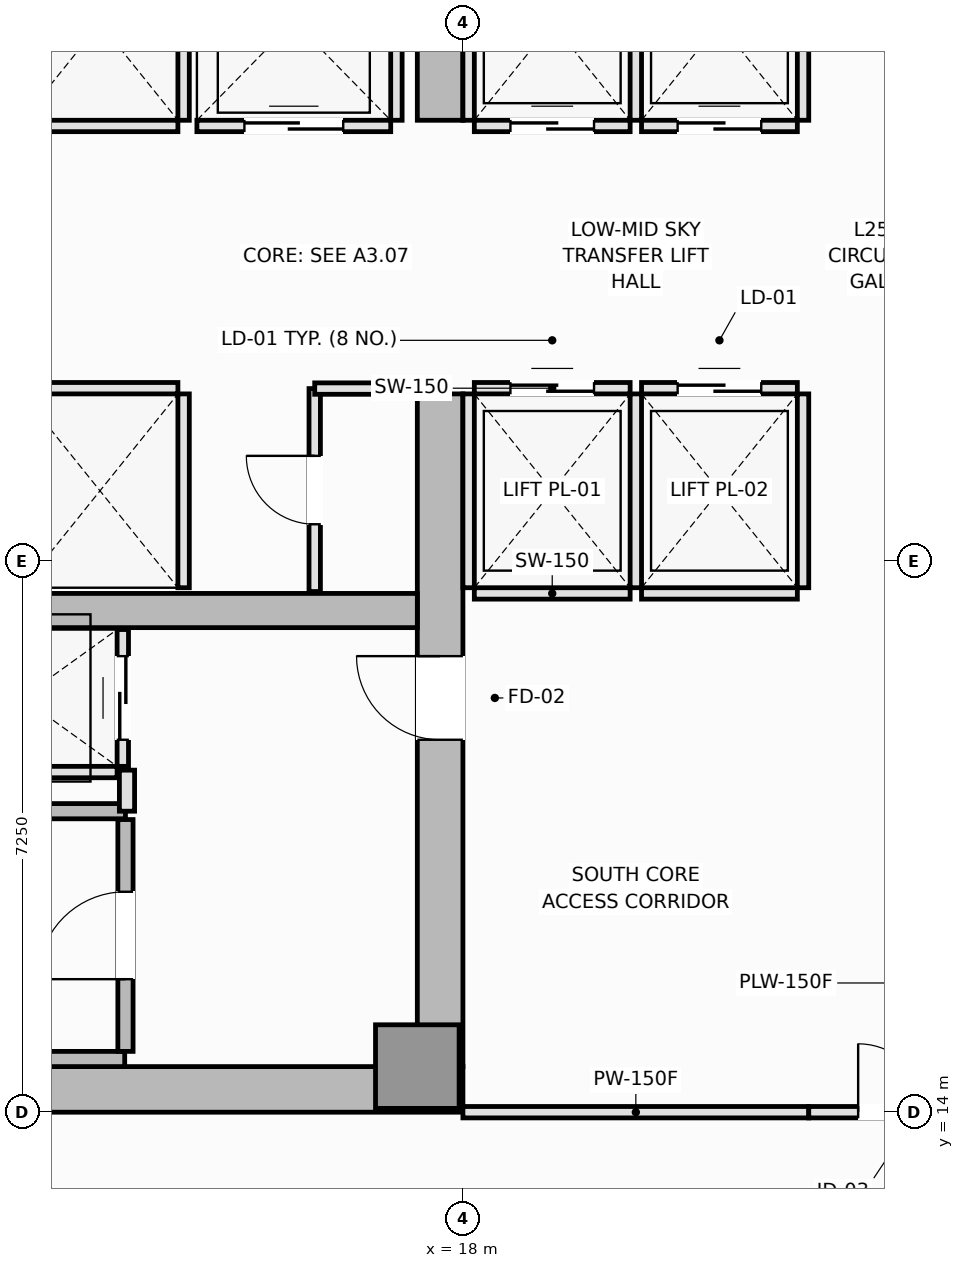
"""IFC4 building model, lengths in metres.
Left out: names, types, materials, properties, quantities, classifications, styles, units other than length and angle.
Written with IfcOpenShell. Run it as: python <this file> out.ifc"""

import sys

from ifc_helpers import new_model, si_unit, direction, frame, frame_2d, origin, origin_2d, place, context, subcontext, project, spatial, rectangle, extrude, element, fill, save


model = new_model("IFC4")
c1 = context("Model", 3, precision=1e-05, world=origin(), true_north=direction((0.0, 1.0)))
c2 = subcontext(c1, "Body", "Model", "MODEL_VIEW")
j1 = project(units=[si_unit("LENGTHUNIT", "METRE"), si_unit("PLANEANGLEUNIT", "RADIAN")], contexts=[c1])
p1 = place(None, origin())
s1 = spatial("IfcSite", under=j1, at=p1, CompositionType="ELEMENT")
p2 = place(p1, origin())
s2 = spatial("IfcBuilding", under=s1, at=p2, CompositionType="ELEMENT")
p3 = place(p2, frame((0.0, 0.0, 97.85)))
s3 = spatial("IfcBuildingStorey", under=s2, at=p3, CompositionType="ELEMENT", Elevation=97.85)
p4 = place(p3, frame((4.5, 14.3, 0.0), z_axis=(0.0, 0.0, 1.0), x_axis=(1.0, 0.0, 0.0)))
e1 = element("IfcWall", 1, at=p4, inside=s3, PredefinedType="SHEAR", context=c2, shape_type="SweptSolid", body=[
    extrude(rectangle(XDim=13.5, YDim=0.6, at=frame_2d((6.75, 0.0))), origin(), (0.0, 0.0, 1.0), 4.4),
])
p5 = place(p3, frame((17.7, 14.6, 0.0), z_axis=(0.0, 0.0, 1.0), x_axis=(0.0, 1.0, 0.0)))
e2 = element("IfcWall", 2, at=p5, inside=s3, PredefinedType="SHEAR", context=c2, shape_type="SweptSolid", body=[
    extrude(rectangle(XDim=8.85, YDim=0.6, at=frame_2d((4.425, 0.0))), origin(), (0.0, 0.0, 1.0), 4.4),
])
p6 = place(p5, frame((4.3, 0.0, 0.0)))
e3 = element("IfcOpeningElement", 3, at=p6, cuts=e2, PredefinedType="OPENING", context=c2, shape_type="SweptSolid", body=[
    extrude(rectangle(XDim=1.1, YDim=2.15, at=frame_2d((0.55, 1.075))), frame((0.0, 0.31, 0.0), z_axis=(0.0, -1.0, 0.0), x_axis=(1.0, 0.0, 0.0)), (0.0, 0.0, 1.0), 0.62),
])
p7 = place(p3, frame((17.7, 27.05, 0.0), z_axis=(0.0, 0.0, 1.0), x_axis=(0.0, 1.0, 0.0)))
e4 = element("IfcWall", 4, at=p7, inside=s3, PredefinedType="SHEAR", context=c2, shape_type="SweptSolid", body=[
    extrude(rectangle(XDim=8.85, YDim=0.6, at=frame_2d((4.425, 0.0))), origin(), (0.0, 0.0, 1.0), 4.4),
])
p8 = place(p7, frame((3.45, 0.0, 0.0)))
e5 = element("IfcOpeningElement", 5, at=p8, cuts=e4, PredefinedType="OPENING", context=c2, shape_type="SweptSolid", body=[
    extrude(rectangle(XDim=1.1, YDim=2.15, at=frame_2d((0.55, 1.075))), frame((0.0, 0.31, 0.0), z_axis=(0.0, -1.0, 0.0), x_axis=(1.0, 0.0, 0.0)), (0.0, 0.0, 1.0), 0.62),
])
p9 = place(p3, frame((5.1, 20.6, 0.0), z_axis=(0.0, 0.0, 1.0), x_axis=(1.0, 0.0, 0.0)))
e6 = element("IfcWall", 6, at=p9, inside=s3, PredefinedType="SHEAR", context=c2, shape_type="SweptSolid", body=[
    extrude(rectangle(XDim=12.3, YDim=0.45, at=frame_2d((6.15, 0.0))), origin(), (0.0, 0.0, 1.0), 4.4),
])
p10 = place(p3, frame((17.4, 14.6, 0.0), z_axis=(0.0, 0.0, 1.0), x_axis=(1.0, 0.0, 0.0)))
e7 = element("IfcColumn", 7, at=p10, inside=s3, PredefinedType="PILASTER", context=c2, shape_type="SweptSolid", body=[
    extrude(rectangle(XDim=1.1, YDim=1.1, at=origin_2d()), origin(), (0.0, 0.0, 1.0), 4.4),
])
p11 = place(p3, frame((5.8, 14.7, 0.0), z_axis=(0.0, 0.0, 1.0), x_axis=(1.0, 0.0, 0.0)))
e8 = element("IfcWall", 8, at=p11, inside=s3, PredefinedType="SOLIDWALL", context=c2, shape_type="SweptSolid", body=[
    extrude(rectangle(XDim=7.75, YDim=0.2, at=frame_2d((3.875, 0.0))), origin(), (0.0, 0.0, 1.0), 4.4),
])
p12 = place(p3, frame((5.9, 17.96, 0.0), z_axis=(0.0, 0.0, 1.0), x_axis=(1.0, 0.0, 0.0)))
e9 = element("IfcWall", 9, at=p12, inside=s3, PredefinedType="SOLIDWALL", context=c2, shape_type="SweptSolid", body=[
    extrude(rectangle(XDim=7.66, YDim=0.2, at=frame_2d((3.83, 0.0))), origin(), (0.0, 0.0, 1.0), 4.4),
])
p13 = place(p3, frame((13.56, 14.8, 0.0), z_axis=(0.0, 0.0, 1.0), x_axis=(0.0, 1.0, 0.0)))
e10 = element("IfcWall", 10, at=p13, inside=s3, PredefinedType="SOLIDWALL", context=c2, shape_type="SweptSolid", body=[
    extrude(rectangle(XDim=3.05, YDim=0.2, at=frame_2d((1.525, 0.0))), origin(), (0.0, 0.0, 1.0), 4.4),
])
p14 = place(p13, frame((0.95, 0.0, 0.0)))
e11 = element("IfcOpeningElement", 11, at=p14, cuts=e10, PredefinedType="OPENING", context=c2, shape_type="SweptSolid", body=[
    extrude(rectangle(XDim=1.15, YDim=2.15, at=frame_2d((0.575, 1.075))), frame((0.0, 0.11, 0.0), z_axis=(0.0, -1.0, 0.0), x_axis=(1.0, 0.0, 0.0)), (0.0, 0.0, 1.0), 0.22),
])
p15 = place(p3, frame((18.15, 20.825, 0.0), z_axis=(0.0, 0.0, 1.0), x_axis=(1.0, 0.0, 0.0)))
e12 = element("IfcWall", 12, at=p15, inside=s3, PredefinedType="PARTITIONING", context=c2, shape_type="SweptSolid", body=[
    extrude(rectangle(XDim=2.05, YDim=0.15, at=frame_2d((1.025, 0.0))), origin(), (0.0, 0.0, 1.0), 4.22),
])
p16 = place(p3, frame((18.15, 23.525, 0.0), z_axis=(0.0, 0.0, 1.0), x_axis=(1.0, 0.0, 0.0)))
e13 = element("IfcWall", 13, at=p16, inside=s3, PredefinedType="PARTITIONING", context=c2, shape_type="SweptSolid", body=[
    extrude(rectangle(XDim=2.05, YDim=0.15, at=frame_2d((1.025, 0.0))), origin(), (0.0, 0.0, 1.0), 4.22),
])
p17 = place(p16, frame((0.475, 0.0, 0.0)))
e14 = element("IfcOpeningElement", 14, at=p17, cuts=e13, PredefinedType="OPENING", context=c2, shape_type="SweptSolid", body=[
    extrude(rectangle(XDim=1.1, YDim=2.2, at=frame_2d((0.55, 1.1))), frame((0.0, 0.085, 0.0), z_axis=(0.0, -1.0, 0.0), x_axis=(1.0, 0.0, 0.0)), (0.0, 0.0, 1.0), 0.17),
])
for number, where, z_axis, x_axis in (
    (15, (18.075, 20.9, 0.0), (0.0, 0.0, 1.0), (0.0, 1.0, 0.0)),
    (16, (20.275, 20.9, 0.0), (0.0, 0.0, 1.0), (0.0, 1.0, 0.0)),
):
    element("IfcWall", number, at=place(p3, frame(where, z_axis=z_axis, x_axis=x_axis)), inside=s3, PredefinedType="PARTITIONING", context=c2, shape_type="SweptSolid", body=[
        extrude(rectangle(XDim=2.55, YDim=0.15, at=frame_2d((1.275, 0.0))), origin(), (0.0, 0.0, 1.0), 4.22),
    ])
p18 = place(p3, frame((20.35, 20.825, 0.0), z_axis=(0.0, 0.0, 1.0), x_axis=(1.0, 0.0, 0.0)))
e17 = element("IfcWall", 17, at=p18, inside=s3, PredefinedType="PARTITIONING", context=c2, shape_type="SweptSolid", body=[
    extrude(rectangle(XDim=2.05, YDim=0.15, at=frame_2d((1.025, 0.0))), origin(), (0.0, 0.0, 1.0), 4.22),
])
p19 = place(p3, frame((20.35, 23.525, 0.0), z_axis=(0.0, 0.0, 1.0), x_axis=(1.0, 0.0, 0.0)))
e18 = element("IfcWall", 18, at=p19, inside=s3, PredefinedType="PARTITIONING", context=c2, shape_type="SweptSolid", body=[
    extrude(rectangle(XDim=2.05, YDim=0.15, at=frame_2d((1.025, 0.0))), origin(), (0.0, 0.0, 1.0), 4.22),
])
p20 = place(p19, frame((0.475, 0.0, 0.0)))
e19 = element("IfcOpeningElement", 19, at=p20, cuts=e18, PredefinedType="OPENING", context=c2, shape_type="SweptSolid", body=[
    extrude(rectangle(XDim=1.1, YDim=2.2, at=frame_2d((0.55, 1.1))), frame((0.0, 0.085, 0.0), z_axis=(0.0, -1.0, 0.0), x_axis=(1.0, 0.0, 0.0)), (0.0, 0.0, 1.0), 0.17),
])
p21 = place(p3, frame((22.475, 20.9, 0.0), z_axis=(0.0, 0.0, 1.0), x_axis=(0.0, 1.0, 0.0)))
e20 = element("IfcWall", 20, at=p21, inside=s3, PredefinedType="PARTITIONING", context=c2, shape_type="SweptSolid", body=[
    extrude(rectangle(XDim=2.55, YDim=0.15, at=frame_2d((1.275, 0.0))), origin(), (0.0, 0.0, 1.0), 4.22),
])
p22 = place(p3, frame((18.15, 26.975, 0.0), z_axis=(0.0, 0.0, 1.0), x_axis=(1.0, 0.0, 0.0)))
e21 = element("IfcWall", 21, at=p22, inside=s3, PredefinedType="PARTITIONING", context=c2, shape_type="SweptSolid", body=[
    extrude(rectangle(XDim=2.05, YDim=0.15, at=frame_2d((1.025, 0.0))), origin(), (0.0, 0.0, 1.0), 4.22),
])
p23 = place(p22, frame((0.475, 0.0, 0.0)))
e22 = element("IfcOpeningElement", 22, at=p23, cuts=e21, PredefinedType="OPENING", context=c2, shape_type="SweptSolid", body=[
    extrude(rectangle(XDim=1.1, YDim=2.2, at=frame_2d((0.55, 1.1))), frame((0.0, 0.085, 0.0), z_axis=(0.0, -1.0, 0.0), x_axis=(1.0, 0.0, 0.0)), (0.0, 0.0, 1.0), 0.17),
])
for number, where, z_axis, x_axis in (
    (23, (18.075, 27.05, 0.0), (0.0, 0.0, 1.0), (0.0, 1.0, 0.0)),
    (24, (20.275, 27.05, 0.0), (0.0, 0.0, 1.0), (0.0, 1.0, 0.0)),
):
    element("IfcWall", number, at=place(p3, frame(where, z_axis=z_axis, x_axis=x_axis)), inside=s3, PredefinedType="PARTITIONING", context=c2, shape_type="SweptSolid", body=[
        extrude(rectangle(XDim=2.55, YDim=0.15, at=frame_2d((1.275, 0.0))), origin(), (0.0, 0.0, 1.0), 4.22),
    ])
p24 = place(p3, frame((20.35, 26.975, 0.0), z_axis=(0.0, 0.0, 1.0), x_axis=(1.0, 0.0, 0.0)))
e25 = element("IfcWall", 25, at=p24, inside=s3, PredefinedType="PARTITIONING", context=c2, shape_type="SweptSolid", body=[
    extrude(rectangle(XDim=2.05, YDim=0.15, at=frame_2d((1.025, 0.0))), origin(), (0.0, 0.0, 1.0), 4.22),
])
p25 = place(p24, frame((0.475, 0.0, 0.0)))
e26 = element("IfcOpeningElement", 26, at=p25, cuts=e25, PredefinedType="OPENING", context=c2, shape_type="SweptSolid", body=[
    extrude(rectangle(XDim=1.1, YDim=2.2, at=frame_2d((0.55, 1.1))), frame((0.0, 0.085, 0.0), z_axis=(0.0, -1.0, 0.0), x_axis=(1.0, 0.0, 0.0)), (0.0, 0.0, 1.0), 0.17),
])
p26 = place(p3, frame((22.475, 27.05, 0.0), z_axis=(0.0, 0.0, 1.0), x_axis=(0.0, 1.0, 0.0)))
e27 = element("IfcWall", 27, at=p26, inside=s3, PredefinedType="PARTITIONING", context=c2, shape_type="SweptSolid", body=[
    extrude(rectangle(XDim=2.55, YDim=0.15, at=frame_2d((1.275, 0.0))), origin(), (0.0, 0.0, 1.0), 4.22),
])
p27 = place(p3, frame((12.2, 23.525, 0.0), z_axis=(0.0, 0.0, 1.0), x_axis=(1.0, 0.0, 0.0)))
e28 = element("IfcWall", 28, at=p27, inside=s3, PredefinedType="PARTITIONING", context=c2, shape_type="SweptSolid", body=[
    extrude(rectangle(XDim=2.05, YDim=0.15, at=frame_2d((1.025, 0.0))), origin(), (0.0, 0.0, 1.0), 4.22),
])
p28 = place(p3, frame((14.325, 20.9, 0.0), z_axis=(0.0, 0.0, 1.0), x_axis=(0.0, 1.0, 0.0)))
e29 = element("IfcWall", 29, at=p28, inside=s3, PredefinedType="PARTITIONING", context=c2, shape_type="SweptSolid", body=[
    extrude(rectangle(XDim=2.55, YDim=0.15, at=frame_2d((1.275, 0.0))), origin(), (0.0, 0.0, 1.0), 4.22),
])
p29 = place(p3, frame((12.2, 26.975, 0.0), z_axis=(0.0, 0.0, 1.0), x_axis=(1.0, 0.0, 0.0)))
e30 = element("IfcWall", 30, at=p29, inside=s3, PredefinedType="PARTITIONING", context=c2, shape_type="SweptSolid", body=[
    extrude(rectangle(XDim=2.05, YDim=0.15, at=frame_2d((1.025, 0.0))), origin(), (0.0, 0.0, 1.0), 4.22),
])
p30 = place(p3, frame((14.325, 27.05, 0.0), z_axis=(0.0, 0.0, 1.0), x_axis=(0.0, 1.0, 0.0)))
e31 = element("IfcWall", 31, at=p30, inside=s3, PredefinedType="PARTITIONING", context=c2, shape_type="SweptSolid", body=[
    extrude(rectangle(XDim=2.55, YDim=0.15, at=frame_2d((1.275, 0.0))), origin(), (0.0, 0.0, 1.0), 4.22),
])
p31 = place(p3, frame((14.5, 26.975, 0.0), z_axis=(0.0, 0.0, 1.0), x_axis=(1.0, 0.0, 0.0)))
e32 = element("IfcWall", 32, at=p31, inside=s3, PredefinedType="PARTITIONING", context=c2, shape_type="SweptSolid", body=[
    extrude(rectangle(XDim=2.55, YDim=0.15, at=frame_2d((1.275, 0.0))), origin(), (0.0, 0.0, 1.0), 4.22),
])
p32 = place(p31, frame((0.625, 0.0, 0.0)))
e33 = element("IfcOpeningElement", 33, at=p32, cuts=e32, PredefinedType="OPENING", context=c2, shape_type="SweptSolid", body=[
    extrude(rectangle(XDim=1.3, YDim=2.2, at=frame_2d((0.65, 1.1))), frame((0.0, 0.085, 0.0), z_axis=(0.0, -1.0, 0.0), x_axis=(1.0, 0.0, 0.0)), (0.0, 0.0, 1.0), 0.17),
])
p33 = place(p3, frame((17.125, 27.05, 0.0), z_axis=(0.0, 0.0, 1.0), x_axis=(0.0, 1.0, 0.0)))
e34 = element("IfcWall", 34, at=p33, inside=s3, PredefinedType="PARTITIONING", context=c2, shape_type="SweptSolid", body=[
    extrude(rectangle(XDim=2.6, YDim=0.15, at=frame_2d((1.3, 0.0))), origin(), (0.0, 0.0, 1.0), 4.22),
])
p34 = place(p3, frame((10.95, 18.475, 0.0), z_axis=(0.0, 0.0, 1.0), x_axis=(1.0, 0.0, 0.0)))
e35 = element("IfcWall", 35, at=p34, inside=s3, PredefinedType="PARTITIONING", context=c2, shape_type="SweptSolid", body=[
    extrude(rectangle(XDim=2.5, YDim=0.15, at=frame_2d((1.25, 0.0))), origin(), (0.0, 0.0, 1.0), 4.22),
])
p35 = place(p3, frame((13.525, 18.55, 0.0), z_axis=(0.0, 0.0, 1.0), x_axis=(0.0, 1.0, 0.0)))
e36 = element("IfcWall", 36, at=p35, inside=s3, PredefinedType="PARTITIONING", context=c2, shape_type="SweptSolid", body=[
    extrude(rectangle(XDim=1.8, YDim=0.15, at=frame_2d((0.9, 0.0))), origin(), (0.0, 0.0, 1.0), 4.22),
])
p36 = place(p35, frame((0.35, 0.0, 0.0)))
e37 = element("IfcOpeningElement", 37, at=p36, cuts=e36, PredefinedType="OPENING", context=c2, shape_type="SweptSolid", body=[
    extrude(rectangle(XDim=1.1, YDim=2.2, at=frame_2d((0.55, 1.1))), frame((0.0, 0.085, 0.0), z_axis=(0.0, -1.0, 0.0), x_axis=(1.0, 0.0, 0.0)), (0.0, 0.0, 1.0), 0.17),
])
p37 = place(p3, frame((13.58, 17.96, 0.0), z_axis=(0.0, 0.0, 1.0), x_axis=(0.0, 1.0, 0.0)))
e38 = element("IfcWall", 38, at=p37, inside=s3, PredefinedType="PARTITIONING", context=c2, shape_type="SweptSolid", body=[
    extrude(rectangle(XDim=0.54, YDim=0.2, at=frame_2d((0.27, 0.0))), origin(), (0.0, 0.0, 1.0), 4.22),
])
p38 = place(p3, frame((16.05, 20.85, 0.0), z_axis=(0.0, 0.0, 1.0), x_axis=(0.0, 1.0, 0.0)))
e39 = element("IfcWall", 39, at=p38, inside=s3, PredefinedType="PARTITIONING", context=c2, shape_type="SweptSolid", body=[
    extrude(rectangle(XDim=2.67, YDim=0.15, at=frame_2d((1.335, 0.0))), origin(), (0.0, 0.0, 1.0), 4.22),
])
p39 = place(p38, frame((0.885, 0.0, 0.0)))
e40 = element("IfcOpeningElement", 40, at=p39, cuts=e39, PredefinedType="OPENING", context=c2, shape_type="SweptSolid", body=[
    extrude(rectangle(XDim=0.9, YDim=2.1, at=frame_2d((0.45, 1.05))), frame((0.0, 0.085, 0.0), z_axis=(0.0, -1.0, 0.0), x_axis=(1.0, 0.0, 0.0)), (0.0, 0.0, 1.0), 0.17),
])
p40 = place(p3, frame((16.05, 23.52, 0.0), z_axis=(0.0, 0.0, 1.0), x_axis=(1.0, 0.0, 0.0)))
e41 = element("IfcWall", 41, at=p40, inside=s3, PredefinedType="PARTITIONING", context=c2, shape_type="SweptSolid", body=[
    extrude(rectangle(XDim=1.17, YDim=0.15, at=frame_2d((0.585, 0.0))), origin(), (0.0, 0.0, 1.0), 4.22),
])
p41 = place(p3, frame((18.0, 14.0, 0.0), z_axis=(0.0, 0.0, 1.0), x_axis=(1.0, 0.0, 0.0)))
e42 = element("IfcWall", 42, at=p41, inside=s3, PredefinedType="PARTITIONING", context=c2, shape_type="SweptSolid", body=[
    extrude(rectangle(XDim=4.55, YDim=0.15, at=frame_2d((2.275, 0.0))), origin(), (0.0, 0.0, 1.0), 4.22),
])
p42 = place(p3, frame((22.55, 14.0, 0.0), z_axis=(0.0, 0.0, 1.0), x_axis=(1.0, 0.0, 0.0)))
e43 = element("IfcWall", 43, at=p42, inside=s3, PredefinedType="PARTITIONING", context=c2, shape_type="SweptSolid", body=[
    extrude(rectangle(XDim=2.2, YDim=0.15, at=frame_2d((1.1, 0.0))), origin(), (0.0, 0.0, 1.0), 4.22),
])
p43 = place(p42, frame((0.65, 0.0, 0.0)))
e44 = element("IfcOpeningElement", 44, at=p43, cuts=e43, PredefinedType="OPENING", context=c2, shape_type="SweptSolid", body=[
    extrude(rectangle(XDim=0.9, YDim=2.1, at=frame_2d((0.45, 1.05))), frame((0.0, 0.085, 0.0), z_axis=(0.0, -1.0, 0.0), x_axis=(1.0, 0.0, 0.0)), (0.0, 0.0, 1.0), 0.17),
])
p44 = place(p14, origin())
e45 = element("IfcDoor", 45, at=p44, inside=s3, OperationType="SINGLE_SWING_LEFT", PredefinedType="DOOR", context=c2, shape_type="SweptSolid", body=[
    extrude(rectangle(XDim=1.15, YDim=2.15, at=frame_2d((0.575, 1.075))), frame((0.0, 0.025, 0.0), z_axis=(0.0, -1.0, 0.0), x_axis=(1.0, 0.0, 0.0)), (0.0, 0.0, 1.0), 0.05),
])
fill(e11, e45)
p45 = place(p17, origin())
e46 = element("IfcDoor", 46, at=p45, inside=s3, OperationType="DOUBLE_DOOR_SLIDING", PredefinedType="DOOR", context=c2, shape_type="SweptSolid", body=[
    extrude(rectangle(XDim=1.1, YDim=2.2, at=frame_2d((0.55, 1.1))), frame((0.0, 0.025, 0.0), z_axis=(0.0, -1.0, 0.0), x_axis=(1.0, 0.0, 0.0)), (0.0, 0.0, 1.0), 0.05),
])
fill(e14, e46)
p46 = place(p20, origin())
e47 = element("IfcDoor", 47, at=p46, inside=s3, OperationType="DOUBLE_DOOR_SLIDING", PredefinedType="DOOR", context=c2, shape_type="SweptSolid", body=[
    extrude(rectangle(XDim=1.1, YDim=2.2, at=frame_2d((0.55, 1.1))), frame((0.0, 0.025, 0.0), z_axis=(0.0, -1.0, 0.0), x_axis=(1.0, 0.0, 0.0)), (0.0, 0.0, 1.0), 0.05),
])
fill(e19, e47)
p47 = place(p23, origin())
e48 = element("IfcDoor", 48, at=p47, inside=s3, OperationType="DOUBLE_DOOR_SLIDING", PredefinedType="DOOR", context=c2, shape_type="SweptSolid", body=[
    extrude(rectangle(XDim=1.1, YDim=2.2, at=frame_2d((0.55, 1.1))), frame((0.0, 0.025, 0.0), z_axis=(0.0, -1.0, 0.0), x_axis=(1.0, 0.0, 0.0)), (0.0, 0.0, 1.0), 0.05),
])
fill(e22, e48)
p48 = place(p25, origin())
e49 = element("IfcDoor", 49, at=p48, inside=s3, OperationType="DOUBLE_DOOR_SLIDING", PredefinedType="DOOR", context=c2, shape_type="SweptSolid", body=[
    extrude(rectangle(XDim=1.1, YDim=2.2, at=frame_2d((0.55, 1.1))), frame((0.0, 0.025, 0.0), z_axis=(0.0, -1.0, 0.0), x_axis=(1.0, 0.0, 0.0)), (0.0, 0.0, 1.0), 0.05),
])
fill(e26, e49)
p49 = place(p32, origin())
e50 = element("IfcDoor", 50, at=p49, inside=s3, OperationType="DOUBLE_DOOR_SLIDING", PredefinedType="DOOR", context=c2, shape_type="SweptSolid", body=[
    extrude(rectangle(XDim=1.3, YDim=2.2, at=frame_2d((0.65, 1.1))), frame((0.0, 0.025, 0.0), z_axis=(0.0, -1.0, 0.0), x_axis=(1.0, 0.0, 0.0)), (0.0, 0.0, 1.0), 0.05),
])
fill(e33, e50)
p50 = place(p36, origin())
e51 = element("IfcDoor", 51, at=p50, inside=s3, OperationType="DOUBLE_DOOR_SLIDING", PredefinedType="DOOR", context=c2, shape_type="SweptSolid", body=[
    extrude(rectangle(XDim=1.1, YDim=2.2, at=frame_2d((0.55, 1.1))), frame((0.0, 0.025, 0.0), z_axis=(0.0, -1.0, 0.0), x_axis=(1.0, 0.0, 0.0)), (0.0, 0.0, 1.0), 0.05),
])
fill(e37, e51)
p51 = place(p6, origin())
e52 = element("IfcDoor", 52, at=p51, inside=s3, OperationType="SINGLE_SWING_RIGHT", PredefinedType="DOOR", context=c2, shape_type="SweptSolid", body=[
    extrude(rectangle(XDim=1.1, YDim=2.15, at=frame_2d((0.55, 1.075))), frame((0.0, 0.025, 0.0), z_axis=(0.0, -1.0, 0.0), x_axis=(1.0, 0.0, 0.0)), (0.0, 0.0, 1.0), 0.05),
])
fill(e3, e52)
p52 = place(p39, origin())
e53 = element("IfcDoor", 53, at=p52, inside=s3, OperationType="SINGLE_SWING_RIGHT", PredefinedType="DOOR", context=c2, shape_type="SweptSolid", body=[
    extrude(rectangle(XDim=0.9, YDim=2.1, at=frame_2d((0.45, 1.05))), frame((0.0, 0.025, 0.0), z_axis=(0.0, -1.0, 0.0), x_axis=(1.0, 0.0, 0.0)), (0.0, 0.0, 1.0), 0.05),
])
fill(e40, e53)
p53 = place(p43, origin())
e54 = element("IfcDoor", 54, at=p53, inside=s3, OperationType="SINGLE_SWING_LEFT", PredefinedType="DOOR", context=c2, shape_type="SweptSolid", body=[
    extrude(rectangle(XDim=0.9, YDim=2.1, at=frame_2d((0.45, 1.05))), frame((0.0, 0.025, 0.0), z_axis=(0.0, -1.0, 0.0), x_axis=(1.0, 0.0, 0.0)), (0.0, 0.0, 1.0), 0.05),
])
fill(e44, e54)
save(model, sys.argv[1])
